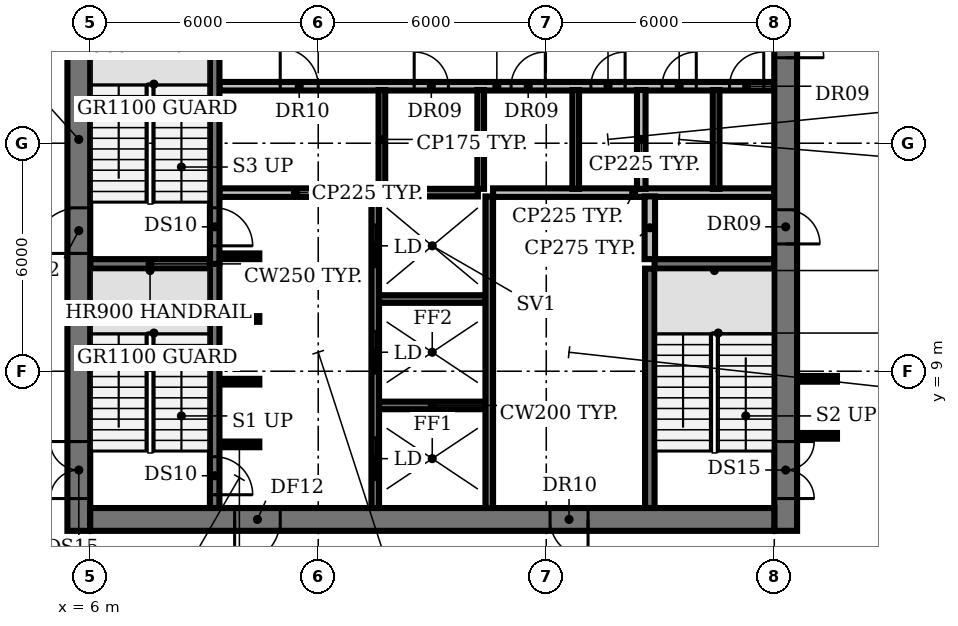
"""IFC4 building model, lengths in metres.
Left out: names, types, materials, properties, quantities, classifications, styles, units other than length and angle.
Written with IfcOpenShell. Run it as: python <this file> out.ifc"""

import sys

from ifc_helpers import new_model, si_unit, direction, frame, frame_2d, origin, place, context, subcontext, project, spatial, rectangle, extrude, element, fill, save


model = new_model("IFC4")
c1 = context("Model", 3, precision=1e-05, world=origin(), true_north=direction((0.0, 1.0)))
c2 = subcontext(c1, "Body", "Model", "MODEL_VIEW")
j1 = project(units=[si_unit("LENGTHUNIT", "METRE"), si_unit("PLANEANGLEUNIT", "RADIAN")], contexts=[c1])
p1 = place(None, origin())
s1 = spatial("IfcSite", under=j1, at=p1, CompositionType="ELEMENT")
p2 = place(p1, origin())
s2 = spatial("IfcBuilding", under=s1, at=p2, CompositionType="ELEMENT")
p3 = place(p2, frame((0.0, 0.0, 163.4)))
s3 = spatial("IfcBuildingStorey", under=s2, at=p3, CompositionType="ELEMENT", Elevation=163.4)
p4 = place(p3, frame((9.4, 7.075, 0.0), z_axis=(0.0, 0.0, 1.0), x_axis=(1.0, 0.0, 0.0)))
e1 = element("IfcWall", 1, at=p4, inside=s3, PredefinedType="SHEAR", context=c2, shape_type="SweptSolid", body=[
    extrude(rectangle(XDim=1.05, YDim=0.15, at=frame_2d((0.525, 0.0))), origin(), (0.0, 0.0, 1.0), 3.85),
])
p5 = place(p3, frame((13.6, 8.1, 0.0), z_axis=(0.0, 0.0, 1.0), x_axis=(1.0, 0.0, 0.0)))
e2 = element("IfcWall", 2, at=p5, inside=s3, PredefinedType="SHEAR", context=c2, shape_type="SweptSolid", body=[
    extrude(rectangle(XDim=2.8, YDim=0.2, at=frame_2d((1.4, 0.0))), origin(), (0.0, 0.0, 1.0), 3.85),
])
for number, where, z_axis, x_axis in (
    (3, (9.4, 8.725, 0.0), (0.0, 0.0, 1.0), (1.0, 0.0, 0.0)),
    (4, (9.4, 10.375, 0.0), (0.0, 0.0, 1.0), (1.0, 0.0, 0.0)),
):
    element("IfcWall", number, at=place(p3, frame(where, z_axis=z_axis, x_axis=x_axis)), inside=s3, PredefinedType="SHEAR", context=c2, shape_type="SweptSolid", body=[
        extrude(rectangle(XDim=1.05, YDim=0.15, at=frame_2d((0.525, 0.0))), origin(), (0.0, 0.0, 1.0), 3.85),
    ])
p6 = place(p3, frame((13.6, 10.9, 0.0), z_axis=(0.0, 0.0, 1.0), x_axis=(1.0, 0.0, 0.0)))
e5 = element("IfcWall", 5, at=p6, inside=s3, PredefinedType="SHEAR", context=c2, shape_type="SweptSolid", body=[
    extrude(rectangle(XDim=2.8, YDim=0.2, at=frame_2d((1.4, 0.0))), origin(), (0.0, 0.0, 1.0), 3.85),
])
for number, where, z_axis, x_axis in (
    (6, (6.0, 11.825, 0.0), (0.0, 0.0, 1.0), (1.0, 0.0, 0.0)),
    (7, (20.85, 11.825, 0.0), (0.0, 0.0, 1.0), (1.0, 0.0, 0.0)),
):
    element("IfcWall", number, at=place(p3, frame(where, z_axis=z_axis, x_axis=x_axis)), inside=s3, PredefinedType="SHEAR", context=c2, shape_type="SweptSolid", body=[
        extrude(rectangle(XDim=3.15, YDim=0.25, at=frame_2d((1.575, 0.0))), origin(), (0.0, 0.0, 1.0), 3.85),
    ])
p7 = place(p3, frame((9.4, 12.025, 0.0), z_axis=(0.0, 0.0, 1.0), x_axis=(1.0, 0.0, 0.0)))
e8 = element("IfcWall", 8, at=p7, inside=s3, PredefinedType="SHEAR", context=c2, shape_type="SweptSolid", body=[
    extrude(rectangle(XDim=1.05, YDim=0.15, at=frame_2d((0.525, 0.0))), origin(), (0.0, 0.0, 1.0), 3.85),
])
p8 = place(p3, frame((9.4, 13.7, 0.0), z_axis=(0.0, 0.0, 1.0), x_axis=(1.0, 0.0, 0.0)))
e9 = element("IfcWall", 9, at=p8, inside=s3, PredefinedType="PARTITIONING", context=c2, shape_type="SweptSolid", body=[
    extrude(rectangle(XDim=4.0, YDim=0.225, at=frame_2d((2.0, 0.0))), origin(), (0.0, 0.0, 1.0), 3.85),
])
p9 = place(p3, frame((13.75, 13.7, 0.0), z_axis=(0.0, 0.0, 1.0), x_axis=(1.0, 0.0, 0.0)))
e10 = element("IfcWall", 10, at=p9, inside=s3, PredefinedType="SHEAR", context=c2, shape_type="SweptSolid", body=[
    extrude(rectangle(XDim=2.45, YDim=0.2, at=frame_2d((1.225, 0.0))), origin(), (0.0, 0.0, 1.0), 3.85),
])
p10 = place(p3, frame((16.6, 13.7, 0.0), z_axis=(0.0, 0.0, 1.0), x_axis=(1.0, 0.0, 0.0)))
e11 = element("IfcWall", 11, at=p10, inside=s3, PredefinedType="PARTITIONING", context=c2, shape_type="SweptSolid", body=[
    extrude(rectangle(XDim=7.4, YDim=0.225, at=frame_2d((3.7, 0.0))), origin(), (0.0, 0.0, 1.0), 3.85),
])
p11 = place(p3, frame((9.4, 16.5, 0.0), z_axis=(0.0, 0.0, 1.0), x_axis=(1.0, 0.0, 0.0)))
e12 = element("IfcWall", 12, at=p11, inside=s3, PredefinedType="PARTITIONING", context=c2, shape_type="SweptSolid", body=[
    extrude(rectangle(XDim=14.6, YDim=0.225, at=frame_2d((7.3, 0.0))), origin(), (0.0, 0.0, 1.0), 3.85),
])
p12 = place(p11, frame((1.6, 0.0, 0.0)))
e13 = element("IfcOpeningElement", 13, at=p12, cuts=e12, PredefinedType="OPENING", context=c2, shape_type="SweptSolid", body=[
    extrude(rectangle(XDim=1.0, YDim=2.1, at=frame_2d((0.5, 1.05))), frame((0.0, 0.123, 0.0), z_axis=(0.0, -1.0, 0.0), x_axis=(1.0, 0.0, 0.0)), (0.0, 0.0, 1.0), 0.245),
])
p13 = place(p11, frame((5.125, 0.0, 0.0)))
e14 = element("IfcOpeningElement", 14, at=p13, cuts=e12, PredefinedType="OPENING", context=c2, shape_type="SweptSolid", body=[
    extrude(rectangle(XDim=0.9, YDim=2.1, at=frame_2d((0.45, 1.05))), frame((0.0, 0.123, 0.0), z_axis=(0.0, -1.0, 0.0), x_axis=(1.0, 0.0, 0.0)), (0.0, 0.0, 1.0), 0.245),
])
p14 = place(p11, frame((7.675, 0.0, 0.0)))
e15 = element("IfcOpeningElement", 15, at=p14, cuts=e12, PredefinedType="OPENING", context=c2, shape_type="SweptSolid", body=[
    extrude(rectangle(XDim=0.9, YDim=2.1, at=frame_2d((0.45, 1.05))), frame((0.0, 0.123, 0.0), z_axis=(0.0, -1.0, 0.0), x_axis=(1.0, 0.0, 0.0)), (0.0, 0.0, 1.0), 0.245),
])
p15 = place(p11, frame((9.775, 0.0, 0.0)))
e16 = element("IfcOpeningElement", 16, at=p15, cuts=e12, PredefinedType="OPENING", context=c2, shape_type="SweptSolid", body=[
    extrude(rectangle(XDim=0.9, YDim=2.1, at=frame_2d((0.45, 1.05))), frame((0.0, 0.123, 0.0), z_axis=(0.0, -1.0, 0.0), x_axis=(1.0, 0.0, 0.0)), (0.0, 0.0, 1.0), 0.245),
])
p16 = place(p11, frame((11.647, 0.0, 0.0)))
e17 = element("IfcOpeningElement", 17, at=p16, cuts=e12, PredefinedType="OPENING", context=c2, shape_type="SweptSolid", body=[
    extrude(rectangle(XDim=0.9, YDim=2.1, at=frame_2d((0.45, 1.05))), frame((0.0, 0.123, 0.0), z_axis=(0.0, -1.0, 0.0), x_axis=(1.0, 0.0, 0.0)), (0.0, 0.0, 1.0), 0.245),
])
p17 = place(p11, frame((13.423, 0.0, 0.0)))
e18 = element("IfcOpeningElement", 18, at=p17, cuts=e12, PredefinedType="OPENING", context=c2, shape_type="SweptSolid", body=[
    extrude(rectangle(XDim=0.9, YDim=2.1, at=frame_2d((0.45, 1.05))), frame((0.0, 0.123, 0.0), z_axis=(0.0, -1.0, 0.0), x_axis=(1.0, 0.0, 0.0)), (0.0, 0.0, 1.0), 0.245),
])
p18 = place(p3, frame((9.275, 11.825, 0.0), z_axis=(0.0, 0.0, 1.0), x_axis=(0.0, -1.0, 0.0)))
e19 = element("IfcWall", 19, at=p18, inside=s3, PredefinedType="SHEAR", context=c2, shape_type="SweptSolid", body=[
    extrude(rectangle(XDim=6.425, YDim=0.25, at=frame_2d((3.212, 0.0))), origin(), (0.0, 0.0, 1.0), 3.85),
])
p19 = place(p18, frame((5.075, 0.0, 0.0)))
e20 = element("IfcOpeningElement", 20, at=p19, cuts=e19, PredefinedType="OPENING", context=c2, shape_type="SweptSolid", body=[
    extrude(rectangle(XDim=1.0, YDim=2.1, at=frame_2d((0.5, 1.05))), frame((0.0, 0.135, 0.0), z_axis=(0.0, -1.0, 0.0), x_axis=(1.0, 0.0, 0.0)), (0.0, 0.0, 1.0), 0.27),
])
p20 = place(p3, frame((9.275, 18.375, 0.0), z_axis=(0.0, 0.0, 1.0), x_axis=(0.0, -1.0, 0.0)))
e21 = element("IfcWall", 21, at=p20, inside=s3, PredefinedType="SHEAR", context=c2, shape_type="SweptSolid", body=[
    extrude(rectangle(XDim=6.55, YDim=0.25, at=frame_2d((3.275, 0.0))), origin(), (0.0, 0.0, 1.0), 3.85),
])
p21 = place(p20, frame((5.075, 0.0, 0.0)))
e22 = element("IfcOpeningElement", 22, at=p21, cuts=e21, PredefinedType="OPENING", context=c2, shape_type="SweptSolid", body=[
    extrude(rectangle(XDim=1.0, YDim=2.1, at=frame_2d((0.5, 1.05))), frame((0.0, 0.135, 0.0), z_axis=(0.0, -1.0, 0.0), x_axis=(1.0, 0.0, 0.0)), (0.0, 0.0, 1.0), 0.27),
])
p22 = place(p3, frame((13.5, 5.4, 0.0), z_axis=(0.0, 0.0, 1.0), x_axis=(0.0, 1.0, 0.0)))
e23 = element("IfcWall", 23, at=p22, inside=s3, PredefinedType="SHEAR", context=c2, shape_type="SweptSolid", body=[
    extrude(rectangle(XDim=8.2, YDim=0.2, at=frame_2d((4.1, 0.0))), origin(), (0.0, 0.0, 1.0), 3.85),
])
p23 = place(p22, frame((0.75, 0.0, 0.0)))
e24 = element("IfcOpeningElement", 24, at=p23, cuts=e23, PredefinedType="OPENING", context=c2, shape_type="SweptSolid", body=[
    extrude(rectangle(XDim=1.1, YDim=2.1, at=frame_2d((0.55, 1.05))), frame((0.0, 0.11, 0.0), z_axis=(0.0, -1.0, 0.0), x_axis=(1.0, 0.0, 0.0)), (0.0, 0.0, 1.0), 0.22),
])
p24 = place(p22, frame((3.55, 0.0, 0.0)))
e25 = element("IfcOpeningElement", 25, at=p24, cuts=e23, PredefinedType="OPENING", context=c2, shape_type="SweptSolid", body=[
    extrude(rectangle(XDim=1.1, YDim=2.1, at=frame_2d((0.55, 1.05))), frame((0.0, 0.11, 0.0), z_axis=(0.0, -1.0, 0.0), x_axis=(1.0, 0.0, 0.0)), (0.0, 0.0, 1.0), 0.22),
])
p25 = place(p22, frame((6.35, 0.0, 0.0)))
e26 = element("IfcOpeningElement", 26, at=p25, cuts=e23, PredefinedType="OPENING", context=c2, shape_type="SweptSolid", body=[
    extrude(rectangle(XDim=1.1, YDim=2.1, at=frame_2d((0.55, 1.05))), frame((0.0, 0.11, 0.0), z_axis=(0.0, -1.0, 0.0), x_axis=(1.0, 0.0, 0.0)), (0.0, 0.0, 1.0), 0.22),
])
for number, where, z_axis, x_axis in (
    (27, (13.675, 13.8, 0.0), (0.0, 0.0, 1.0), (0.0, 1.0, 0.0)),
    (28, (16.275, 13.8, 0.0), (0.0, 0.0, 1.0), (0.0, 1.0, 0.0)),
):
    element("IfcWall", number, at=place(p3, frame(where, z_axis=z_axis, x_axis=x_axis)), inside=s3, PredefinedType="PARTITIONING", context=c2, shape_type="SweptSolid", body=[
        extrude(rectangle(XDim=2.6, YDim=0.175, at=frame_2d((1.3, 0.0))), origin(), (0.0, 0.0, 1.0), 3.85),
    ])
p26 = place(p3, frame((16.5, 5.4, 0.0), z_axis=(0.0, 0.0, 1.0), x_axis=(0.0, 1.0, 0.0)))
e29 = element("IfcWall", 29, at=p26, inside=s3, PredefinedType="SHEAR", context=c2, shape_type="SweptSolid", body=[
    extrude(rectangle(XDim=8.2, YDim=0.2, at=frame_2d((4.1, 0.0))), origin(), (0.0, 0.0, 1.0), 3.85),
])
p27 = place(p3, frame((18.775, 13.8, 0.0), z_axis=(0.0, 0.0, 1.0), x_axis=(0.0, 1.0, 0.0)))
e30 = element("IfcWall", 30, at=p27, inside=s3, PredefinedType="PARTITIONING", context=c2, shape_type="SweptSolid", body=[
    extrude(rectangle(XDim=2.6, YDim=0.175, at=frame_2d((1.3, 0.0))), origin(), (0.0, 0.0, 1.0), 3.85),
])
p28 = place(p3, frame((20.5, 13.8, 0.0), z_axis=(0.0, 0.0, 1.0), x_axis=(0.0, 1.0, 0.0)))
e31 = element("IfcWall", 31, at=p28, inside=s3, PredefinedType="PARTITIONING", context=c2, shape_type="SweptSolid", body=[
    extrude(rectangle(XDim=2.6, YDim=0.225, at=frame_2d((1.3, 0.0))), origin(), (0.0, 0.0, 1.0), 3.85),
])
p29 = place(p3, frame((20.725, 5.4, 0.0), z_axis=(0.0, 0.0, 1.0), x_axis=(0.0, 1.0, 0.0)))
e32 = element("IfcWall", 32, at=p29, inside=s3, PredefinedType="SHEAR", context=c2, shape_type="SweptSolid", body=[
    extrude(rectangle(XDim=6.3, YDim=0.25, at=frame_2d((3.15, 0.0))), origin(), (0.0, 0.0, 1.0), 3.85),
])
p30 = place(p3, frame((20.725, 11.95, 0.0), z_axis=(0.0, 0.0, 1.0), x_axis=(0.0, 1.0, 0.0)))
e33 = element("IfcWall", 33, at=p30, inside=s3, PredefinedType="PARTITIONING", context=c2, shape_type="SweptSolid", body=[
    extrude(rectangle(XDim=1.65, YDim=0.275, at=frame_2d((0.825, 0.0))), origin(), (0.0, 0.0, 1.0), 3.85),
])
p31 = place(p3, frame((22.47, 13.8, 0.0), z_axis=(0.0, 0.0, 1.0), x_axis=(0.0, 1.0, 0.0)))
e34 = element("IfcWall", 34, at=p31, inside=s3, PredefinedType="PARTITIONING", context=c2, shape_type="SweptSolid", body=[
    extrude(rectangle(XDim=2.6, YDim=0.175, at=frame_2d((1.3, 0.0))), origin(), (0.0, 0.0, 1.0), 3.85),
])
p32 = place(p3, frame((5.7, 4.8, 0.0), z_axis=(0.0, 0.0, 1.0), x_axis=(0.0, 1.0, 0.0)))
e35 = element("IfcWall", 35, at=p32, inside=s3, PredefinedType="SHEAR", context=c2, shape_type="SweptSolid", body=[
    extrude(rectangle(XDim=20.6, YDim=0.6, at=frame_2d((10.3, 0.0))), origin(), (0.0, 0.0, 1.0), 3.85),
])
p33 = place(p32, frame((0.85, 0.0, 0.0)))
e36 = element("IfcOpeningElement", 36, at=p33, cuts=e35, PredefinedType="OPENING", context=c2, shape_type="SweptSolid", body=[
    extrude(rectangle(XDim=1.5, YDim=2.1, at=frame_2d((0.75, 1.05))), frame((0.0, 0.31, 0.0), z_axis=(0.0, -1.0, 0.0), x_axis=(1.0, 0.0, 0.0)), (0.0, 0.0, 1.0), 0.62),
])
p34 = place(p32, frame((7.3, 0.0, 0.0)))
e37 = element("IfcOpeningElement", 37, at=p34, cuts=e35, PredefinedType="OPENING", context=c2, shape_type="SweptSolid", body=[
    extrude(rectangle(XDim=1.2, YDim=2.1, at=frame_2d((0.6, 1.05))), frame((0.0, 0.31, 0.0), z_axis=(0.0, -1.0, 0.0), x_axis=(1.0, 0.0, 0.0)), (0.0, 0.0, 1.0), 0.62),
])
p35 = place(p32, frame((13.85, 0.0, 0.0)))
e38 = element("IfcOpeningElement", 38, at=p35, cuts=e35, PredefinedType="OPENING", context=c2, shape_type="SweptSolid", body=[
    extrude(rectangle(XDim=1.2, YDim=2.1, at=frame_2d((0.6, 1.05))), frame((0.0, 0.31, 0.0), z_axis=(0.0, -1.0, 0.0), x_axis=(1.0, 0.0, 0.0)), (0.0, 0.0, 1.0), 0.62),
])
p36 = place(p3, frame((24.3, 25.555, 0.0), z_axis=(0.0, 0.0, 1.0), x_axis=(0.0, -1.0, 0.0)))
e39 = element("IfcWall", 39, at=p36, inside=s3, PredefinedType="SHEAR", context=c2, shape_type="SweptSolid", body=[
    extrude(rectangle(XDim=20.755, YDim=0.6, at=frame_2d((10.377, 0.0))), origin(), (0.0, 0.0, 1.0), 3.85),
])
p37 = place(p36, frame((18.405, 0.0, 0.0)))
e40 = element("IfcOpeningElement", 40, at=p37, cuts=e39, PredefinedType="OPENING", context=c2, shape_type="SweptSolid", body=[
    extrude(rectangle(XDim=1.5, YDim=2.1, at=frame_2d((0.75, 1.05))), frame((0.0, 0.31, 0.0), z_axis=(0.0, -1.0, 0.0), x_axis=(1.0, 0.0, 0.0)), (0.0, 0.0, 1.0), 0.62),
])
p38 = place(p36, frame((12.305, 0.0, 0.0)))
e41 = element("IfcOpeningElement", 41, at=p38, cuts=e39, PredefinedType="OPENING", context=c2, shape_type="SweptSolid", body=[
    extrude(rectangle(XDim=0.9, YDim=2.1, at=frame_2d((0.45, 1.05))), frame((0.0, 0.31, 0.0), z_axis=(0.0, -1.0, 0.0), x_axis=(1.0, 0.0, 0.0)), (0.0, 0.0, 1.0), 0.62),
])
p39 = place(p36, frame((6.305, 0.0, 0.0)))
e42 = element("IfcOpeningElement", 42, at=p39, cuts=e39, PredefinedType="OPENING", context=c2, shape_type="SweptSolid", body=[
    extrude(rectangle(XDim=2.0, YDim=2.1, at=frame_2d((1.0, 1.05))), frame((0.0, 0.31, 0.0), z_axis=(0.0, -1.0, 0.0), x_axis=(1.0, 0.0, 0.0)), (0.0, 0.0, 1.0), 0.62),
])
p40 = place(p3, frame((24.0, 5.1, 0.0), z_axis=(0.0, 0.0, 1.0), x_axis=(-1.0, 0.0, 0.0)))
e43 = element("IfcWall", 43, at=p40, inside=s3, PredefinedType="SHEAR", context=c2, shape_type="SweptSolid", body=[
    extrude(rectangle(XDim=18.0, YDim=0.6, at=frame_2d((9.0, 0.0))), origin(), (0.0, 0.0, 1.0), 3.85),
])
p41 = place(p40, frame((13.0, 0.0, 0.0)))
e44 = element("IfcOpeningElement", 44, at=p41, cuts=e43, PredefinedType="OPENING", context=c2, shape_type="SweptSolid", body=[
    extrude(rectangle(XDim=1.2, YDim=2.1, at=frame_2d((0.6, 1.05))), frame((0.0, 0.31, 0.0), z_axis=(0.0, -1.0, 0.0), x_axis=(1.0, 0.0, 0.0)), (0.0, 0.0, 1.0), 0.62),
])
p42 = place(p40, frame((4.9, 0.0, 0.0)))
e45 = element("IfcOpeningElement", 45, at=p42, cuts=e43, PredefinedType="OPENING", context=c2, shape_type="SweptSolid", body=[
    extrude(rectangle(XDim=1.0, YDim=2.1, at=frame_2d((0.5, 1.05))), frame((0.0, 0.31, 0.0), z_axis=(0.0, -1.0, 0.0), x_axis=(1.0, 0.0, 0.0)), (0.0, 0.0, 1.0), 0.62),
])
for number, where, z_axis, x_axis in (
    (46, (24.6, 7.3, 0.0), (0.0, 0.0, 1.0), (1.0, 0.0, 0.0)),
    (47, (24.6, 8.8, 0.0), (0.0, 0.0, 1.0), (1.0, 0.0, 0.0)),
):
    element("IfcWall", number, at=place(p3, frame(where, z_axis=z_axis, x_axis=x_axis)), inside=s3, PredefinedType="PARTITIONING", context=c2, shape_type="SweptSolid", body=[
        extrude(rectangle(XDim=1.05, YDim=0.15, at=frame_2d((0.525, 0.0))), origin(), (0.0, 0.0, 1.0), 2.88),
    ])
p43 = place(p12, origin())
e48 = element("IfcDoor", 48, at=p43, inside=s3, OperationType="SINGLE_SWING_LEFT", PredefinedType="DOOR", context=c2, shape_type="SweptSolid", body=[
    extrude(rectangle(XDim=1.0, YDim=2.1, at=frame_2d((0.5, 1.05))), frame((0.0, 0.025, 0.0), z_axis=(0.0, -1.0, 0.0), x_axis=(1.0, 0.0, 0.0)), (0.0, 0.0, 1.0), 0.05),
])
fill(e13, e48)
p44 = place(p13, origin())
e49 = element("IfcDoor", 49, at=p44, inside=s3, OperationType="SINGLE_SWING_LEFT", PredefinedType="DOOR", context=c2, shape_type="SweptSolid", body=[
    extrude(rectangle(XDim=0.9, YDim=2.1, at=frame_2d((0.45, 1.05))), frame((0.0, 0.025, 0.0), z_axis=(0.0, -1.0, 0.0), x_axis=(1.0, 0.0, 0.0)), (0.0, 0.0, 1.0), 0.05),
])
fill(e14, e49)
p45 = place(p14, origin())
e50 = element("IfcDoor", 50, at=p45, inside=s3, OperationType="SINGLE_SWING_RIGHT", PredefinedType="DOOR", context=c2, shape_type="SweptSolid", body=[
    extrude(rectangle(XDim=0.9, YDim=2.1, at=frame_2d((0.45, 1.05))), frame((0.0, 0.025, 0.0), z_axis=(0.0, -1.0, 0.0), x_axis=(1.0, 0.0, 0.0)), (0.0, 0.0, 1.0), 0.05),
])
fill(e15, e50)
p46 = place(p15, origin())
e51 = element("IfcDoor", 51, at=p46, inside=s3, OperationType="SINGLE_SWING_RIGHT", PredefinedType="DOOR", context=c2, shape_type="SweptSolid", body=[
    extrude(rectangle(XDim=0.9, YDim=2.1, at=frame_2d((0.45, 1.05))), frame((0.0, 0.025, 0.0), z_axis=(0.0, -1.0, 0.0), x_axis=(1.0, 0.0, 0.0)), (0.0, 0.0, 1.0), 0.05),
])
fill(e16, e51)
p47 = place(p16, origin())
e52 = element("IfcDoor", 52, at=p47, inside=s3, OperationType="SINGLE_SWING_RIGHT", PredefinedType="DOOR", context=c2, shape_type="SweptSolid", body=[
    extrude(rectangle(XDim=0.9, YDim=2.1, at=frame_2d((0.45, 1.05))), frame((0.0, 0.025, 0.0), z_axis=(0.0, -1.0, 0.0), x_axis=(1.0, 0.0, 0.0)), (0.0, 0.0, 1.0), 0.05),
])
fill(e17, e52)
p48 = place(p17, origin())
e53 = element("IfcDoor", 53, at=p48, inside=s3, OperationType="SINGLE_SWING_RIGHT", PredefinedType="DOOR", context=c2, shape_type="SweptSolid", body=[
    extrude(rectangle(XDim=0.9, YDim=2.1, at=frame_2d((0.45, 1.05))), frame((0.0, 0.025, 0.0), z_axis=(0.0, -1.0, 0.0), x_axis=(1.0, 0.0, 0.0)), (0.0, 0.0, 1.0), 0.05),
])
fill(e18, e53)
p49 = place(p19, origin())
e54 = element("IfcDoor", 54, at=p49, inside=s3, OperationType="SINGLE_SWING_RIGHT", PredefinedType="DOOR", context=c2, shape_type="SweptSolid", body=[
    extrude(rectangle(XDim=1.0, YDim=2.1, at=frame_2d((0.5, 1.05))), frame((0.0, 0.025, 0.0), z_axis=(0.0, -1.0, 0.0), x_axis=(1.0, 0.0, 0.0)), (0.0, 0.0, 1.0), 0.05),
])
fill(e20, e54)
p50 = place(p21, origin())
e55 = element("IfcDoor", 55, at=p50, inside=s3, OperationType="SINGLE_SWING_RIGHT", PredefinedType="DOOR", context=c2, shape_type="SweptSolid", body=[
    extrude(rectangle(XDim=1.0, YDim=2.1, at=frame_2d((0.5, 1.05))), frame((0.0, 0.025, 0.0), z_axis=(0.0, -1.0, 0.0), x_axis=(1.0, 0.0, 0.0)), (0.0, 0.0, 1.0), 0.05),
])
fill(e22, e55)
p51 = place(p23, origin())
e56 = element("IfcDoor", 56, at=p51, inside=s3, OperationType="DOUBLE_DOOR_SLIDING", PredefinedType="DOOR", context=c2, shape_type="SweptSolid", body=[
    extrude(rectangle(XDim=1.1, YDim=2.1, at=frame_2d((0.55, 1.05))), frame((0.0, 0.025, 0.0), z_axis=(0.0, -1.0, 0.0), x_axis=(1.0, 0.0, 0.0)), (0.0, 0.0, 1.0), 0.05),
])
fill(e24, e56)
p52 = place(p24, origin())
e57 = element("IfcDoor", 57, at=p52, inside=s3, OperationType="DOUBLE_DOOR_SLIDING", PredefinedType="DOOR", context=c2, shape_type="SweptSolid", body=[
    extrude(rectangle(XDim=1.1, YDim=2.1, at=frame_2d((0.55, 1.05))), frame((0.0, 0.025, 0.0), z_axis=(0.0, -1.0, 0.0), x_axis=(1.0, 0.0, 0.0)), (0.0, 0.0, 1.0), 0.05),
])
fill(e25, e57)
p53 = place(p25, origin())
e58 = element("IfcDoor", 58, at=p53, inside=s3, OperationType="DOUBLE_DOOR_SLIDING", PredefinedType="DOOR", context=c2, shape_type="SweptSolid", body=[
    extrude(rectangle(XDim=1.1, YDim=2.1, at=frame_2d((0.55, 1.05))), frame((0.0, 0.025, 0.0), z_axis=(0.0, -1.0, 0.0), x_axis=(1.0, 0.0, 0.0)), (0.0, 0.0, 1.0), 0.05),
])
fill(e26, e58)
p54 = place(p33, origin())
e59 = element("IfcDoor", 59, at=p54, inside=s3, OperationType="DOUBLE_DOOR_SINGLE_SWING", PredefinedType="DOOR", context=c2, shape_type="SweptSolid", body=[
    extrude(rectangle(XDim=1.5, YDim=2.1, at=frame_2d((0.75, 1.05))), frame((0.0, 0.025, 0.0), z_axis=(0.0, -1.0, 0.0), x_axis=(1.0, 0.0, 0.0)), (0.0, 0.0, 1.0), 0.05),
])
fill(e36, e59)
p55 = place(p34, origin())
e60 = element("IfcDoor", 60, at=p55, inside=s3, OperationType="SINGLE_SWING_LEFT", PredefinedType="DOOR", context=c2, shape_type="SweptSolid", body=[
    extrude(rectangle(XDim=1.2, YDim=2.1, at=frame_2d((0.6, 1.05))), frame((0.0, 0.025, 0.0), z_axis=(0.0, -1.0, 0.0), x_axis=(1.0, 0.0, 0.0)), (0.0, 0.0, 1.0), 0.05),
])
fill(e37, e60)
p56 = place(p37, origin())
e61 = element("IfcDoor", 61, at=p56, inside=s3, OperationType="DOUBLE_DOOR_SINGLE_SWING", PredefinedType="DOOR", context=c2, shape_type="SweptSolid", body=[
    extrude(rectangle(XDim=1.5, YDim=2.1, at=frame_2d((0.75, 1.05))), frame((0.0, 0.025, 0.0), z_axis=(0.0, -1.0, 0.0), x_axis=(1.0, 0.0, 0.0)), (0.0, 0.0, 1.0), 0.05),
])
fill(e40, e61)
p57 = place(p38, origin())
e62 = element("IfcDoor", 62, at=p57, inside=s3, OperationType="SINGLE_SWING_RIGHT", PredefinedType="DOOR", context=c2, shape_type="SweptSolid", body=[
    extrude(rectangle(XDim=0.9, YDim=2.1, at=frame_2d((0.45, 1.05))), frame((0.0, -0.24, 0.0), z_axis=(0.0, -1.0, 0.0), x_axis=(1.0, 0.0, 0.0)), (0.0, 0.0, 1.0), 0.05),
])
fill(e41, e62)
p58 = place(p39, origin())
e63 = element("IfcDoor", 63, at=p58, inside=s3, OperationType="DOUBLE_DOOR_SINGLE_SWING", PredefinedType="DOOR", context=c2, shape_type="SweptSolid", body=[
    extrude(rectangle(XDim=2.0, YDim=2.1, at=frame_2d((1.0, 1.05))), frame((0.0, 0.025, 0.0), z_axis=(0.0, -1.0, 0.0), x_axis=(1.0, 0.0, 0.0)), (0.0, 0.0, 1.0), 0.05),
])
fill(e42, e63)
p59 = place(p41, origin())
e64 = element("IfcDoor", 64, at=p59, inside=s3, OperationType="SINGLE_SWING_RIGHT", PredefinedType="DOOR", context=c2, shape_type="SweptSolid", body=[
    extrude(rectangle(XDim=1.2, YDim=2.1, at=frame_2d((0.6, 1.05))), frame((0.0, 0.025, 0.0), z_axis=(0.0, -1.0, 0.0), x_axis=(1.0, 0.0, 0.0)), (0.0, 0.0, 1.0), 0.05),
])
fill(e44, e64)
p60 = place(p42, origin())
e65 = element("IfcDoor", 65, at=p60, inside=s3, OperationType="SINGLE_SWING_LEFT", PredefinedType="DOOR", context=c2, shape_type="SweptSolid", body=[
    extrude(rectangle(XDim=1.0, YDim=2.1, at=frame_2d((0.5, 1.05))), frame((0.0, -0.24, 0.0), z_axis=(0.0, -1.0, 0.0), x_axis=(1.0, 0.0, 0.0)), (0.0, 0.0, 1.0), 0.05),
])
fill(e45, e65)
save(model, sys.argv[1])
